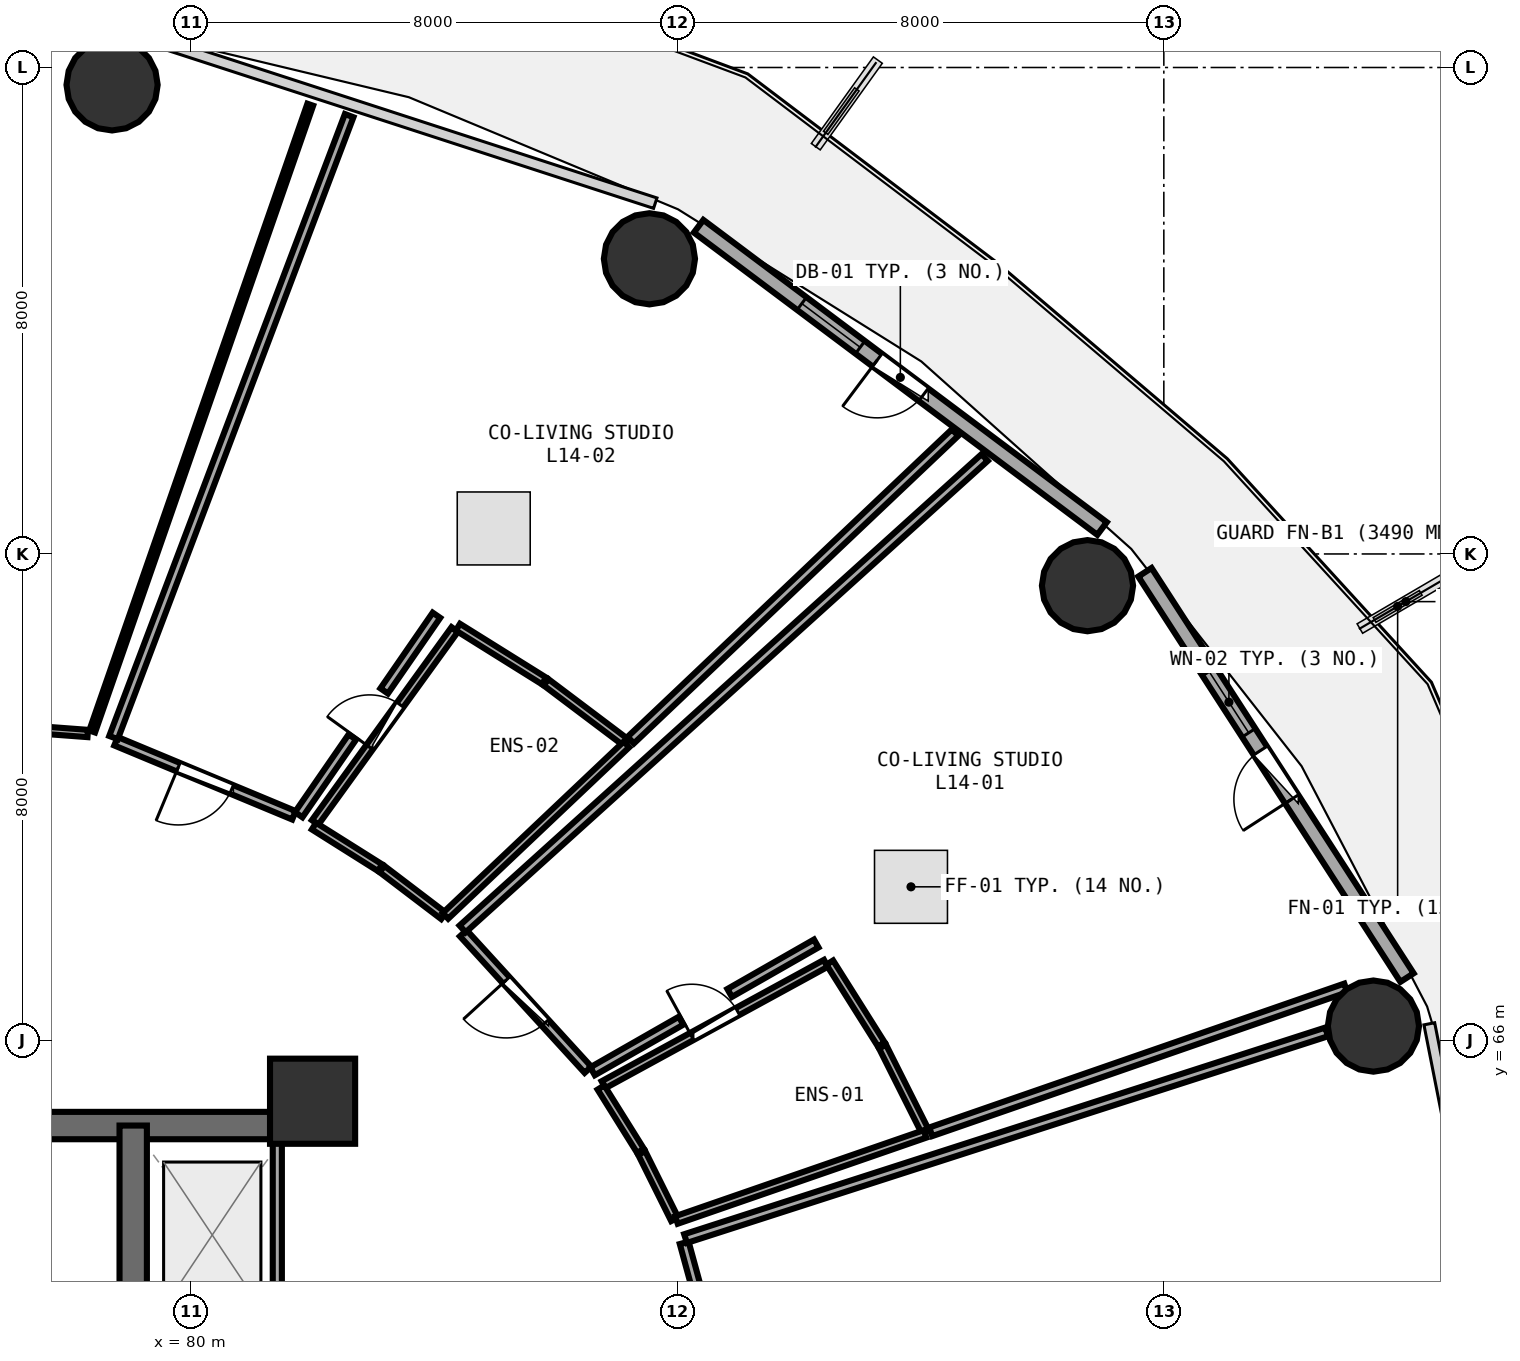
"""IFC4 building model, lengths in metres.
Left out: names, types, materials, properties, quantities, classifications, styles, units other than length and angle.
Written with IfcOpenShell. Run it as: python <this file> out.ifc"""

import sys

from ifc_helpers import new_model, si_unit, direction, frame, frame_2d, origin, origin_2d, place, context, subcontext, project, spatial, rectangle, circle, extrude, element, fill, save


model = new_model("IFC4")
c1 = context("Model", 3, precision=1e-05, world=origin(), true_north=direction((0.0, 1.0)))
c2 = subcontext(c1, "Body", "Model", "MODEL_VIEW")
j1 = project(units=[si_unit("LENGTHUNIT", "METRE"), si_unit("PLANEANGLEUNIT", "RADIAN")], contexts=[c1])
p1 = place(None, origin())
s1 = spatial("IfcSite", under=j1, at=p1, CompositionType="ELEMENT")
p2 = place(p1, origin())
s2 = spatial("IfcBuilding", under=s1, at=p2, CompositionType="ELEMENT")
p3 = place(p2, frame((0.0, 0.0, 56.25)))
s3 = spatial("IfcBuildingStorey", under=s2, at=p3, CompositionType="ELEMENT", Elevation=56.25)
p4 = place(p3, frame((82.0, 65.0, 0.0), z_axis=(0.0, 0.0, 1.0), x_axis=(1.0, 0.0, 0.0)))
e1 = element("IfcColumn", 1, at=p4, inside=s3, PredefinedType="PILASTER", context=c2, shape_type="SweptSolid", body=[
    extrude(rectangle(XDim=1.4, YDim=1.4, at=origin_2d()), origin(), (0.0, 0.0, 1.0), 3.75),
])
for number, where, z_axis, x_axis in (
    (2, (99.447, 66.236, 0.0), (0.0, 0.0, 1.0), (1.0, 0.0, 0.0)),
    (3, (94.744, 73.478, 0.0), (0.0, 0.0, 1.0), (1.0, 0.0, 0.0)),
    (4, (87.54, 78.854, 0.0), (0.0, 0.0, 1.0), (1.0, 0.0, 0.0)),
    (5, (78.702, 81.714, 0.0), (0.0, 0.0, 1.0), (1.0, 0.0, 0.0)),
):
    element("IfcColumn", number, at=place(p3, frame(where, z_axis=z_axis, x_axis=x_axis)), inside=s3, PredefinedType="COLUMN", context=c2, shape_type="SweptSolid", body=[
        extrude(circle(Radius=0.75, at=origin_2d()), origin(), (0.0, 0.0, 1.0), 3.75),
    ])
p5 = place(p3, frame((99.999, 67.033, 0.0), z_axis=(0.0, 0.0, 1.0), x_axis=(-0.543005114258, 0.839729388488, 0.0)))
e6 = element("IfcWall", 6, at=p5, inside=s3, PredefinedType="SOLIDWALL", context=c2, shape_type="SweptSolid", body=[
    extrude(rectangle(XDim=7.938, YDim=0.26, at=frame_2d((3.969, 0.0))), origin(), (0.0, 0.0, 1.0), 3.475),
])
p6 = place(p5, frame((3.494, 0.0, 0.0)))
e7 = element("IfcOpeningElement", 7, at=p6, cuts=e6, PredefinedType="OPENING", context=c2, shape_type="SweptSolid", body=[
    extrude(rectangle(XDim=0.95, YDim=2.1, at=frame_2d((0.475, 1.05))), frame((0.0, 0.14, 0.0), z_axis=(0.0, -1.0, 0.0), x_axis=(1.0, 0.0, 0.0)), (0.0, 0.0, 1.0), 0.28),
])
p7 = place(p5, frame((4.794, 0.0, 0.85)))
e8 = element("IfcOpeningElement", 8, at=p7, cuts=e6, PredefinedType="OPENING", context=c2, shape_type="SweptSolid", body=[
    extrude(rectangle(XDim=1.2, YDim=1.45, at=frame_2d((0.6, 0.725))), frame((0.0, 0.14, 0.0), z_axis=(0.0, -1.0, 0.0), x_axis=(1.0, 0.0, 0.0)), (0.0, 0.0, 1.0), 0.28),
])
p8 = place(p3, frame((94.984, 74.418, 0.0), z_axis=(0.0, 0.0, 1.0), x_axis=(-0.80030733173, 0.599590005569, 0.0)))
e9 = element("IfcWall", 9, at=p8, inside=s3, PredefinedType="SOLIDWALL", context=c2, shape_type="SweptSolid", body=[
    extrude(rectangle(XDim=8.291, YDim=0.26, at=frame_2d((4.145, 0.0))), origin(), (0.0, 0.0, 1.0), 3.475),
])
p9 = place(p8, frame((3.67, 0.0, 0.0)))
e10 = element("IfcOpeningElement", 10, at=p9, cuts=e9, PredefinedType="OPENING", context=c2, shape_type="SweptSolid", body=[
    extrude(rectangle(XDim=0.95, YDim=2.1, at=frame_2d((0.475, 1.05))), frame((0.0, 0.14, 0.0), z_axis=(0.0, -1.0, 0.0), x_axis=(1.0, 0.0, 0.0)), (0.0, 0.0, 1.0), 0.28),
])
p10 = place(p8, frame((4.97, 0.0, 0.85)))
e11 = element("IfcOpeningElement", 11, at=p10, cuts=e9, PredefinedType="OPENING", context=c2, shape_type="SweptSolid", body=[
    extrude(rectangle(XDim=1.2, YDim=1.45, at=frame_2d((0.6, 0.725))), frame((0.0, 0.14, 0.0), z_axis=(0.0, -1.0, 0.0), x_axis=(1.0, 0.0, 0.0)), (0.0, 0.0, 1.0), 0.28),
])
p11 = place(p3, frame((74.0, 64.6, 0.0), z_axis=(0.0, 0.0, 1.0), x_axis=(1.0, 0.0, 0.0)))
e12 = element("IfcWall", 12, at=p11, inside=s3, PredefinedType="SHEAR", context=c2, shape_type="SweptSolid", body=[
    extrude(rectangle(XDim=8.0, YDim=0.45, at=frame_2d((4.0, 0.0))), origin(), (0.0, 0.0, 1.0), 3.49),
])
p12 = place(p3, frame((79.05, 58.3, 0.0), z_axis=(0.0, 0.0, 1.0), x_axis=(0.0, 1.0, 0.0)))
e13 = element("IfcWall", 13, at=p12, inside=s3, PredefinedType="SHEAR", context=c2, shape_type="SweptSolid", body=[
    extrude(rectangle(XDim=6.3, YDim=0.45, at=frame_2d((3.15, 0.0))), origin(), (0.0, 0.0, 1.0), 3.49),
])
p13 = place(p3, frame((81.42, 61.48, 0.0), z_axis=(0.0, 0.0, 1.0), x_axis=(0.0, 1.0, 0.0)))
e14 = element("IfcWall", 14, at=p13, inside=s3, PredefinedType="PARTITIONING", context=c2, shape_type="SweptSolid", body=[
    extrude(rectangle(XDim=2.84, YDim=0.15, at=frame_2d((1.42, 0.0))), origin(), (0.0, 0.0, 1.0), 3.48),
])
p14 = place(p3, frame((86.785, 65.272, 0.0), z_axis=(0.0, 0.0, 1.0), x_axis=(0.877747757983, 0.479123025283, 0.0)))
e15 = element("IfcWall", 15, at=p14, inside=s3, PredefinedType="PLUMBINGWALL", context=c2, shape_type="SweptSolid", body=[
    extrude(rectangle(XDim=4.167, YDim=0.13, at=frame_2d((2.083, 0.0))), origin(), (0.0, 0.0, 1.0), 2.875),
])
p15 = place(p14, frame((1.654, 0.0, 0.0)))
e16 = element("IfcOpeningElement", 16, at=p15, cuts=e15, PredefinedType="OPENING", context=c2, shape_type="SweptSolid", body=[
    extrude(rectangle(XDim=0.86, YDim=2.05, at=frame_2d((0.43, 1.025))), frame((0.0, 0.075, 0.0), z_axis=(0.0, -1.0, 0.0), x_axis=(1.0, 0.0, 0.0)), (0.0, 0.0, 1.0), 0.15),
])
p16 = place(p3, frame((86.53, 65.517, 0.0), z_axis=(0.0, 0.0, 1.0), x_axis=(-0.674433052632, 0.738336005839, 0.0)))
e17 = element("IfcWall", 17, at=p16, inside=s3, PredefinedType="PARTITIONING", context=c2, shape_type="SweptSolid", body=[
    extrude(rectangle(XDim=3.041, YDim=0.15, at=frame_2d((1.521, 0.0))), origin(), (0.0, 0.0, 1.0), 2.875),
])
p17 = place(p16, frame((1.046, 0.0, 0.0)))
e18 = element("IfcOpeningElement", 18, at=p17, cuts=e17, PredefinedType="OPENING", context=c2, shape_type="SweptSolid", body=[
    extrude(rectangle(XDim=0.95, YDim=2.08, at=frame_2d((0.475, 1.04))), frame((0.0, 0.085, 0.0), z_axis=(0.0, -1.0, 0.0), x_axis=(1.0, 0.0, 0.0)), (0.0, 0.0, 1.0), 0.17),
])
p18 = place(p3, frame((82.041, 69.583, 0.0), z_axis=(0.0, 0.0, 1.0), x_axis=(0.586113694769, 0.810228817559, 0.0)))
e19 = element("IfcWall", 19, at=p18, inside=s3, PredefinedType="PLUMBINGWALL", context=c2, shape_type="SweptSolid", body=[
    extrude(rectangle(XDim=3.918, YDim=0.13, at=frame_2d((1.959, 0.0))), origin(), (0.0, 0.0, 1.0), 3.235),
])
p19 = place(p18, frame((1.529, 0.0, 0.0)))
e20 = element("IfcOpeningElement", 20, at=p19, cuts=e19, PredefinedType="OPENING", context=c2, shape_type="SweptSolid", body=[
    extrude(rectangle(XDim=0.86, YDim=2.05, at=frame_2d((0.43, 1.025))), frame((0.0, 0.075, 0.0), z_axis=(0.0, -1.0, 0.0), x_axis=(1.0, 0.0, 0.0)), (0.0, 0.0, 1.0), 0.15),
])
p20 = place(p3, frame((81.694, 69.702, 0.0), z_axis=(0.0, 0.0, 1.0), x_axis=(-0.923245473314, 0.384210614124, 0.0)))
e21 = element("IfcWall", 21, at=p20, inside=s3, PredefinedType="PARTITIONING", context=c2, shape_type="SweptSolid", body=[
    extrude(rectangle(XDim=3.169, YDim=0.15, at=frame_2d((1.585, 0.0))), origin(), (0.0, 0.0, 1.0), 2.875),
])
p21 = place(p20, frame((1.11, 0.0, 0.0)))
e22 = element("IfcOpeningElement", 22, at=p21, cuts=e21, PredefinedType="OPENING", context=c2, shape_type="SweptSolid", body=[
    extrude(rectangle(XDim=0.95, YDim=2.08, at=frame_2d((0.475, 1.04))), frame((0.0, 0.085, 0.0), z_axis=(0.0, -1.0, 0.0), x_axis=(1.0, 0.0, 0.0)), (0.0, 0.0, 1.0), 0.17),
])
p22 = place(p3, frame((78.302, 71.048, 0.0), z_axis=(0.0, 0.0, 1.0), x_axis=(-0.997215128993, 0.074578726908, 0.0)))
e23 = element("IfcWall", 23, at=p22, inside=s3, PredefinedType="PARTITIONING", context=c2, shape_type="SweptSolid", body=[
    extrude(rectangle(XDim=6.207, YDim=0.12, at=frame_2d((3.104, 0.0))), origin(), (0.0, 0.0, 1.0), 3.235),
])
p23 = place(p22, frame((2.653, 0.0, 0.0)))
e24 = element("IfcOpeningElement", 24, at=p23, cuts=e23, PredefinedType="OPENING", context=c2, shape_type="SweptSolid", body=[
    extrude(rectangle(XDim=0.9, YDim=2.08, at=frame_2d((0.45, 1.04))), frame((0.0, 0.07, 0.0), z_axis=(0.0, -1.0, 0.0), x_axis=(1.0, 0.0, 0.0)), (0.0, 0.0, 1.0), 0.14),
])
p24 = place(p3, frame((88.884, 59.845, 0.0), z_axis=(0.0, 0.0, 1.0), x_axis=(-0.263653235341, 0.964617526014, 0.0)))
e25 = element("IfcWall", 25, at=p24, inside=s3, PredefinedType="PARTITIONING", context=c2, shape_type="SweptSolid", body=[
    extrude(rectangle(XDim=2.93, YDim=0.15, at=frame_2d((1.465, 0.0))), origin(), (0.0, 0.0, 1.0), 3.48),
])
p25 = place(p24, frame((0.99, 0.0, 0.0)))
e26 = element("IfcOpeningElement", 26, at=p25, cuts=e25, PredefinedType="OPENING", context=c2, shape_type="SweptSolid", body=[
    extrude(rectangle(XDim=0.95, YDim=2.08, at=frame_2d((0.475, 1.04))), frame((0.0, 0.085, 0.0), z_axis=(0.0, -1.0, 0.0), x_axis=(1.0, 0.0, 0.0)), (0.0, 0.0, 1.0), 0.17),
])
p26 = place(p3, frame((87.956, 63.058, 0.0), z_axis=(0.0, 0.0, 1.0), x_axis=(-0.445610682281, 0.895226853841, 0.0)))
e27 = element("IfcWall", 27, at=p26, inside=s3, PredefinedType="PLUMBINGWALL", context=c2, shape_type="SweptSolid", body=[
    extrude(rectangle(XDim=1.219, YDim=0.13, at=frame_2d((0.609, 0.0))), origin(), (0.0, 0.0, 1.0), 3.48),
])
p27 = place(p3, frame((87.393, 64.184, 0.0), z_axis=(0.0, 0.0, 1.0), x_axis=(-0.5296416079, 0.848221531901, 0.0)))
e28 = element("IfcWall", 28, at=p27, inside=s3, PredefinedType="PLUMBINGWALL", context=c2, shape_type="SweptSolid", body=[
    extrude(rectangle(XDim=1.229, YDim=0.13, at=frame_2d((0.614, 0.0))), origin(), (0.0, 0.0, 1.0), 2.875),
])
p28 = place(p3, frame((90.506, 67.28, 0.0), z_axis=(0.0, 0.0, 1.0), x_axis=(0.533000334155, -0.846115029881, 0.0)))
e29 = element("IfcWall", 29, at=p28, inside=s3, PredefinedType="PLUMBINGWALL", context=c2, shape_type="SweptSolid", body=[
    extrude(rectangle(XDim=1.592, YDim=0.13, at=frame_2d((0.796, 0.0))), origin(), (0.0, 0.0, 1.0), 3.48),
])
p29 = place(p3, frame((91.374, 65.898, 0.0), z_axis=(0.0, 0.0, 1.0), x_axis=(0.448882213202, -0.893590934752, 0.0)))
e30 = element("IfcWall", 30, at=p29, inside=s3, PredefinedType="PLUMBINGWALL", context=c2, shape_type="SweptSolid", body=[
    extrude(rectangle(XDim=1.579, YDim=0.13, at=frame_2d((0.79, 0.0))), origin(), (0.0, 0.0, 1.0), 2.875),
])
p30 = place(p3, frame((92.073, 64.462, 0.0), z_axis=(0.0, 0.0, 1.0), x_axis=(-0.944946491884, -0.327224888228, 0.0)))
e31 = element("IfcWall", 31, at=p30, inside=s3, PredefinedType="PLUMBINGWALL", context=c2, shape_type="SweptSolid", body=[
    extrude(rectangle(XDim=4.327, YDim=0.13, at=frame_2d((2.164, 0.0))), origin(), (0.0, 0.0, 1.0), 3.235),
])
p31 = place(p3, frame((84.468, 67.834, 0.0), z_axis=(0.0, 0.0, 1.0), x_axis=(0.742191353367, 0.670188029577, 0.0)))
e32 = element("IfcWall", 32, at=p31, inside=s3, PredefinedType="PARTITIONING", context=c2, shape_type="SweptSolid", body=[
    extrude(rectangle(XDim=11.569, YDim=0.15, at=frame_2d((5.785, 0.0))), origin(), (0.0, 0.0, 1.0), 2.875),
])
p32 = place(p3, frame((98.992, 66.864, 0.0), z_axis=(0.0, 0.0, 1.0), x_axis=(-0.944826855148, -0.327570166212, 0.0)))
e33 = element("IfcWall", 33, at=p32, inside=s3, PredefinedType="PARTITIONING", context=c2, shape_type="SweptSolid", body=[
    extrude(rectangle(XDim=7.224, YDim=0.15, at=frame_2d((3.612, 0.0))), origin(), (0.0, 0.0, 1.0), 2.875),
])
p33 = place(p3, frame((90.283, 67.594, 0.0), z_axis=(0.0, 0.0, 1.0), x_axis=(-0.868279787631, -0.496074803221, 0.0)))
e34 = element("IfcWall", 34, at=p33, inside=s3, PredefinedType="PARTITIONING", context=c2, shape_type="SweptSolid", body=[
    extrude(rectangle(XDim=1.64, YDim=0.15, at=frame_2d((0.82, 0.0))), origin(), (0.0, 0.0, 1.0), 3.48),
])
p34 = place(p3, frame((88.06, 66.324, 0.0), z_axis=(0.0, 0.0, 1.0), x_axis=(-0.86835963742, -0.495935016004, 0.0)))
e35 = element("IfcWall", 35, at=p34, inside=s3, PredefinedType="PARTITIONING", context=c2, shape_type="SweptSolid", body=[
    extrude(rectangle(XDim=1.676, YDim=0.15, at=frame_2d((0.838, 0.0))), origin(), (0.0, 0.0, 1.0), 2.875),
])
p35 = place(p3, frame((84.155, 68.047, 0.0), z_axis=(0.0, 0.0, 1.0), x_axis=(-0.795884944477, 0.605447896317, 0.0)))
e36 = element("IfcWall", 36, at=p35, inside=s3, PredefinedType="PLUMBINGWALL", context=c2, shape_type="SweptSolid", body=[
    extrude(rectangle(XDim=1.273, YDim=0.13, at=frame_2d((0.636, 0.0))), origin(), (0.0, 0.0, 1.0), 2.875),
])
p36 = place(p3, frame((83.109, 68.841, 0.0), z_axis=(0.0, 0.0, 1.0), x_axis=(-0.846337656307, 0.532646760544, 0.0)))
e37 = element("IfcWall", 37, at=p36, inside=s3, PredefinedType="PLUMBINGWALL", context=c2, shape_type="SweptSolid", body=[
    extrude(rectangle(XDim=1.283, YDim=0.13, at=frame_2d((0.642, 0.0))), origin(), (0.0, 0.0, 1.0), 3.48),
])
p37 = place(p3, frame((84.39, 72.796, 0.0), z_axis=(0.0, 0.0, 1.0), x_axis=(0.848326822388, -0.529472947766, 0.0)))
e38 = element("IfcWall", 38, at=p37, inside=s3, PredefinedType="PLUMBINGWALL", context=c2, shape_type="SweptSolid", body=[
    extrude(rectangle(XDim=1.669, YDim=0.13, at=frame_2d((0.834, 0.0))), origin(), (0.0, 0.0, 1.0), 2.875),
])
p38 = place(p3, frame((85.839, 71.89, 0.0), z_axis=(0.0, 0.0, 1.0), x_axis=(0.798688091321, -0.601745239102, 0.0)))
e39 = element("IfcWall", 39, at=p38, inside=s3, PredefinedType="PLUMBINGWALL", context=c2, shape_type="SweptSolid", body=[
    extrude(rectangle(XDim=1.655, YDim=0.13, at=frame_2d((0.828, 0.0))), origin(), (0.0, 0.0, 1.0), 3.48),
])
p39 = place(p3, frame((87.163, 70.868, 0.0), z_axis=(0.0, 0.0, 1.0), x_axis=(-0.726077844379, -0.687612509996, 0.0)))
e40 = element("IfcWall", 40, at=p39, inside=s3, PredefinedType="PLUMBINGWALL", context=c2, shape_type="SweptSolid", body=[
    extrude(rectangle(XDim=4.1, YDim=0.13, at=frame_2d((2.05, 0.0))), origin(), (0.0, 0.0, 1.0), 3.235),
])
p40 = place(p3, frame((78.726, 70.98, 0.0), z_axis=(0.0, 0.0, 1.0), x_axis=(0.354325845477, 0.935122021571, 0.0)))
e41 = element("IfcWall", 41, at=p40, inside=s3, PredefinedType="PARTITIONING", context=c2, shape_type="SweptSolid", body=[
    extrude(rectangle(XDim=10.938, YDim=0.15, at=frame_2d((5.469, 0.0))), origin(), (0.0, 0.0, 1.0), 2.875),
])
p41 = place(p3, frame((92.567, 75.997, 0.0), z_axis=(0.0, 0.0, 1.0), x_axis=(-0.725622707533, -0.688092789028, 0.0)))
e42 = element("IfcWall", 42, at=p41, inside=s3, PredefinedType="PARTITIONING", context=c2, shape_type="SweptSolid", body=[
    extrude(rectangle(XDim=7.351, YDim=0.15, at=frame_2d((3.675, 0.0))), origin(), (0.0, 0.0, 1.0), 2.875),
])
p42 = place(p3, frame((84.037, 72.992, 0.0), z_axis=(0.0, 0.0, 1.0), x_axis=(-0.568328597461, -0.822801680424, 0.0)))
e43 = element("IfcWall", 43, at=p42, inside=s3, PredefinedType="PARTITIONING", context=c2, shape_type="SweptSolid", body=[
    extrude(rectangle(XDim=1.513, YDim=0.15, at=frame_2d((0.756, 0.0))), origin(), (0.0, 0.0, 1.0), 3.48),
])
p43 = place(p3, frame((82.655, 70.99, 0.0), z_axis=(0.0, 0.0, 1.0), x_axis=(-0.568335150004, -0.822797154389, 0.0)))
e44 = element("IfcWall", 44, at=p43, inside=s3, PredefinedType="PARTITIONING", context=c2, shape_type="SweptSolid", body=[
    extrude(rectangle(XDim=1.553, YDim=0.15, at=frame_2d((0.777, 0.0))), origin(), (0.0, 0.0, 1.0), 3.235),
])
p44 = place(p3, frame((81.962, 81.388, 0.0), z_axis=(0.0, 0.0, 1.0), x_axis=(-0.328662915274, -0.944447292401, 0.0)))
e45 = element("IfcWall", 45, at=p44, inside=s3, PredefinedType="PARTITIONING", context=c2, shape_type="SweptSolid", body=[
    extrude(rectangle(XDim=10.914, YDim=0.1, at=frame_2d((5.457, 0.0))), origin(), (0.0, 0.0, 1.0), 2.875),
])
p45 = place(p3, frame((88.134, 62.741, 0.0), z_axis=(0.0, 0.0, 1.0), x_axis=(0.951774856366, 0.30679736438, 0.0)))
e46 = element("IfcWall", 46, at=p45, inside=s3, PredefinedType="PARTITIONING", context=c2, shape_type="SweptSolid", body=[
    extrude(rectangle(XDim=11.078, YDim=0.15, at=frame_2d((5.539, 0.0))), origin(), (0.0, 0.0, 1.0), 2.875),
])
p46 = place(p6, frame((0.95, 0.0, 0.0), z_axis=(0.0, 0.0, 1.0), x_axis=(-1.0, 0.0, 0.0)))
e47 = element("IfcDoor", 47, at=p46, inside=s3, OperationType="SINGLE_SWING_RIGHT", PredefinedType="DOOR", context=c2, shape_type="SweptSolid", body=[
    extrude(rectangle(XDim=0.95, YDim=2.1, at=frame_2d((0.475, 1.05))), frame((0.0, 0.025, 0.0), z_axis=(0.0, -1.0, 0.0), x_axis=(1.0, 0.0, 0.0)), (0.0, 0.0, 1.0), 0.05),
])
fill(e7, e47)
p47 = place(p7, origin())
e48 = element("IfcWindow", 48, at=p47, inside=s3, PartitioningType="SINGLE_PANEL", PredefinedType="WINDOW", context=c2, shape_type="SweptSolid", body=[
    extrude(rectangle(XDim=1.2, YDim=1.45, at=frame_2d((0.6, 0.725))), frame((0.0, 0.03, 0.0), z_axis=(0.0, -1.0, 0.0), x_axis=(1.0, 0.0, 0.0)), (0.0, 0.0, 1.0), 0.06),
])
fill(e8, e48)
p48 = place(p9, frame((0.95, 0.0, 0.0), z_axis=(0.0, 0.0, 1.0), x_axis=(-1.0, 0.0, 0.0)))
e49 = element("IfcDoor", 49, at=p48, inside=s3, OperationType="SINGLE_SWING_LEFT", PredefinedType="DOOR", context=c2, shape_type="SweptSolid", body=[
    extrude(rectangle(XDim=0.95, YDim=2.1, at=frame_2d((0.475, 1.05))), frame((0.0, 0.025, 0.0), z_axis=(0.0, -1.0, 0.0), x_axis=(1.0, 0.0, 0.0)), (0.0, 0.0, 1.0), 0.05),
])
fill(e10, e49)
p49 = place(p10, origin())
e50 = element("IfcWindow", 50, at=p49, inside=s3, PartitioningType="SINGLE_PANEL", PredefinedType="WINDOW", context=c2, shape_type="SweptSolid", body=[
    extrude(rectangle(XDim=1.2, YDim=1.45, at=frame_2d((0.6, 0.725))), frame((0.0, 0.03, 0.0), z_axis=(0.0, -1.0, 0.0), x_axis=(1.0, 0.0, 0.0)), (0.0, 0.0, 1.0), 0.06),
])
fill(e11, e50)
p50 = place(p15, origin())
e51 = element("IfcDoor", 51, at=p50, inside=s3, OperationType="SINGLE_SWING_LEFT", PredefinedType="DOOR", context=c2, shape_type="SweptSolid", body=[
    extrude(rectangle(XDim=0.86, YDim=2.05, at=frame_2d((0.43, 1.025))), frame((0.0, 0.025, 0.0), z_axis=(0.0, -1.0, 0.0), x_axis=(1.0, 0.0, 0.0)), (0.0, 0.0, 1.0), 0.05),
])
fill(e16, e51)
p51 = place(p17, origin())
e52 = element("IfcDoor", 52, at=p51, inside=s3, OperationType="SINGLE_SWING_RIGHT", PredefinedType="DOOR", context=c2, shape_type="SweptSolid", body=[
    extrude(rectangle(XDim=0.95, YDim=2.08, at=frame_2d((0.475, 1.04))), frame((0.0, 0.025, 0.0), z_axis=(0.0, -1.0, 0.0), x_axis=(1.0, 0.0, 0.0)), (0.0, 0.0, 1.0), 0.05),
])
fill(e18, e52)
p52 = place(p19, origin())
e53 = element("IfcDoor", 53, at=p52, inside=s3, OperationType="SINGLE_SWING_LEFT", PredefinedType="DOOR", context=c2, shape_type="SweptSolid", body=[
    extrude(rectangle(XDim=0.86, YDim=2.05, at=frame_2d((0.43, 1.025))), frame((0.0, 0.025, 0.0), z_axis=(0.0, -1.0, 0.0), x_axis=(1.0, 0.0, 0.0)), (0.0, 0.0, 1.0), 0.05),
])
fill(e20, e53)
p53 = place(p21, origin())
e54 = element("IfcDoor", 54, at=p53, inside=s3, OperationType="SINGLE_SWING_RIGHT", PredefinedType="DOOR", context=c2, shape_type="SweptSolid", body=[
    extrude(rectangle(XDim=0.95, YDim=2.08, at=frame_2d((0.475, 1.04))), frame((0.0, 0.025, 0.0), z_axis=(0.0, -1.0, 0.0), x_axis=(1.0, 0.0, 0.0)), (0.0, 0.0, 1.0), 0.05),
])
fill(e22, e54)
save(model, sys.argv[1])
